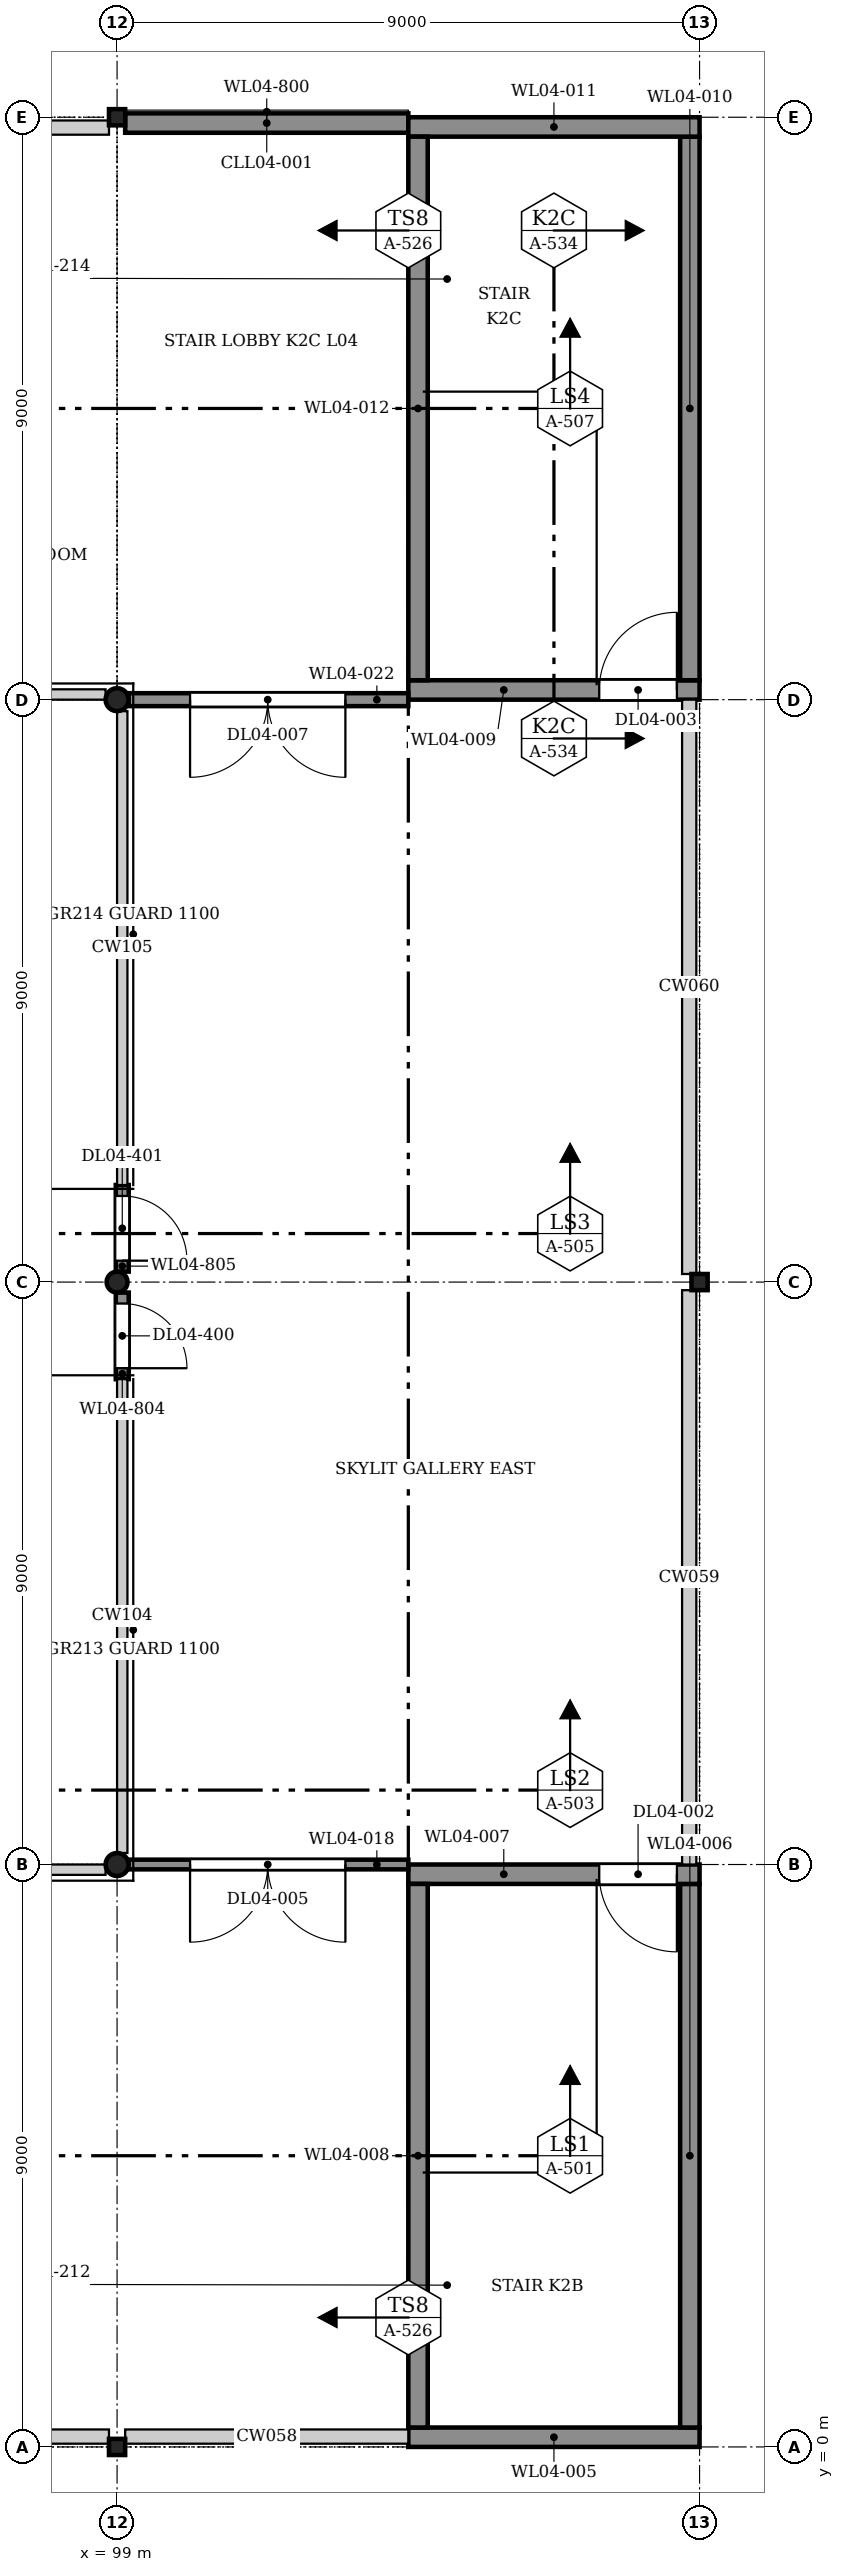
"""IFC4 building model, lengths in metres.
Left out: names, types, materials, properties, quantities, classifications, styles, units other than length and angle.
Written with IfcOpenShell. Run it as: python <this file> out.ifc"""

import sys

from ifc_helpers import new_model, si_unit, direction, frame, frame_2d, origin, origin_2d, place, context, subcontext, project, spatial, polyline, rectangle, hollow_rectangle, hollow_circle, outline, extrude, element, fill, save


model = new_model("IFC4")
c1 = context("Model", 3, precision=1e-05, world=origin(), true_north=direction((0.0, 1.0)))
c2 = subcontext(c1, "Body", "Model", "MODEL_VIEW")
j1 = project(units=[si_unit("LENGTHUNIT", "METRE"), si_unit("PLANEANGLEUNIT", "RADIAN")], contexts=[c1])
p1 = place(None, origin())
s1 = spatial("IfcSite", under=j1, at=p1, CompositionType="ELEMENT")
p2 = place(p1, origin())
s2 = spatial("IfcBuilding", under=s1, at=p2, CompositionType="ELEMENT")
p3 = place(p2, frame((0.0, 0.0, 21.2)))
s3 = spatial("IfcBuildingStorey", under=s2, at=p3, CompositionType="ELEMENT", Elevation=21.2)
p4 = place(p3, frame((99.0, 0.0, 0.0), z_axis=(0.0, 0.0, 1.0), x_axis=(1.0, 0.0, 0.0)))
e1 = element("IfcColumn", 1, at=p4, inside=s3, PredefinedType="COLUMN", context=c2, shape_type="SweptSolid", body=[
    extrude(hollow_rectangle(XDim=0.25, YDim=0.25, WallThickness=0.01, InnerFilletRadius=0.015, OuterFilletRadius=0.025, at=origin_2d()), origin(), (0.0, 0.0, 1.0), 3.6),
])
p5 = place(p3, frame((99.0, 9.0, 0.0), z_axis=(0.0, 0.0, 1.0), x_axis=(1.0, 0.0, 0.0)))
e2 = element("IfcColumn", 2, at=p5, inside=s3, PredefinedType="COLUMN", context=c2, shape_type="SweptSolid", body=[
    extrude(hollow_circle(Radius=0.178, WallThickness=0.013, at=origin_2d()), origin(), (0.0, 0.0, 1.0), 3.6),
])
p6 = place(p3, frame((99.0, 18.0, 0.0), z_axis=(0.0, 0.0, 1.0), x_axis=(1.0, 0.0, 0.0)))
e3 = element("IfcColumn", 3, at=p6, inside=s3, PredefinedType="COLUMN", context=c2, shape_type="SweptSolid", body=[
    extrude(hollow_circle(Radius=0.162, WallThickness=0.01, at=origin_2d()), origin(), (0.0, 0.0, 1.0), 3.6),
])
p7 = place(p3, frame((108.0, 18.0, 0.0), z_axis=(0.0, 0.0, 1.0), x_axis=(1.0, 0.0, 0.0)))
e4 = element("IfcColumn", 4, at=p7, inside=s3, PredefinedType="COLUMN", context=c2, shape_type="SweptSolid", body=[
    extrude(hollow_rectangle(XDim=0.25, YDim=0.25, WallThickness=0.01, InnerFilletRadius=0.015, OuterFilletRadius=0.025, at=origin_2d()), origin(), (0.0, 0.0, 1.0), 3.6),
])
p8 = place(p3, frame((99.0, 27.0, 0.0), z_axis=(0.0, 0.0, 1.0), x_axis=(1.0, 0.0, 0.0)))
e5 = element("IfcColumn", 5, at=p8, inside=s3, PredefinedType="COLUMN", context=c2, shape_type="SweptSolid", body=[
    extrude(hollow_circle(Radius=0.178, WallThickness=0.013, at=origin_2d()), origin(), (0.0, 0.0, 1.0), 3.6),
])
p9 = place(p3, frame((99.0, 36.0, 0.0), z_axis=(0.0, 0.0, 1.0), x_axis=(1.0, 0.0, 0.0)))
e6 = element("IfcColumn", 6, at=p9, inside=s3, PredefinedType="COLUMN", context=c2, shape_type="SweptSolid", body=[
    extrude(hollow_rectangle(XDim=0.25, YDim=0.25, WallThickness=0.01, InnerFilletRadius=0.015, OuterFilletRadius=0.025, at=origin_2d()), origin(), (0.0, 0.0, 1.0), 3.4),
])
p10 = place(p3, frame((99.125, 35.91, 0.0), z_axis=(0.0, 0.0, 1.0), x_axis=(1.0, 0.0, 0.0)))
e7 = element("IfcWall", 7, at=p10, inside=s3, PredefinedType="SOLIDWALL", context=c2, shape_type="SweptSolid", body=[
    extrude(rectangle(XDim=4.375, YDim=0.3, at=frame_2d((2.188, 0.0))), origin(), (0.0, 0.0, 1.0), 3.42),
])
p11 = place(p3, frame((99.125, 35.91, 3.878), z_axis=(0.0, 0.0, 1.0), x_axis=(1.0, 0.0, 0.0)))
e8 = element("IfcWall", 8, at=p11, inside=s3, PredefinedType="PARAPET", context=c2, shape_type="SweptSolid", body=[
    extrude(rectangle(XDim=4.375, YDim=0.2, at=frame_2d((2.188, 0.0))), origin(), (0.0, 0.0, 1.0), 0.522),
])
p12 = place(p3, frame((90.1, 35.96, 3.878), z_axis=(0.0, 0.0, 1.0), x_axis=(1.0, 0.0, 0.0)))
e9 = element("IfcWall", 9, at=p12, inside=s3, PredefinedType="PARAPET", context=c2, shape_type="SweptSolid", body=[
    extrude(rectangle(XDim=8.775, YDim=0.2, at=frame_2d((4.387, 0.0))), origin(), (0.0, 0.0, 1.0), 0.522),
])
p13 = place(p3, frame((99.08, 16.5, 0.0), z_axis=(0.0, 0.0, 1.0), x_axis=(0.0, 1.0, 0.0)))
e10 = element("IfcWall", 10, at=p13, inside=s3, PredefinedType="SOLIDWALL", context=c2, shape_type="SweptSolid", body=[
    extrude(rectangle(XDim=1.338, YDim=0.2, at=frame_2d((0.669, 0.0))), origin(), (0.0, 0.0, 1.0), 3.878),
])
p14 = place(p13, frame((0.169, 0.0, 0.0)))
e11 = element("IfcOpeningElement", 11, at=p14, cuts=e10, PredefinedType="OPENING", context=c2, shape_type="SweptSolid", body=[
    extrude(rectangle(XDim=1.0, YDim=2.4, at=frame_2d((0.5, 1.2))), frame((0.0, 0.11, 0.0), z_axis=(0.0, -1.0, 0.0), x_axis=(1.0, 0.0, 0.0)), (0.0, 0.0, 1.0), 0.22),
])
p15 = place(p3, frame((99.08, 18.162, 0.0), z_axis=(0.0, 0.0, 1.0), x_axis=(0.0, 1.0, 0.0)))
e12 = element("IfcWall", 12, at=p15, inside=s3, PredefinedType="SOLIDWALL", context=c2, shape_type="SweptSolid", body=[
    extrude(rectangle(XDim=1.338, YDim=0.2, at=frame_2d((0.669, 0.0))), origin(), (0.0, 0.0, 1.0), 3.878),
])
p16 = place(p15, frame((0.169, 0.0, 0.0)))
e13 = element("IfcOpeningElement", 13, at=p16, cuts=e12, PredefinedType="OPENING", context=c2, shape_type="SweptSolid", body=[
    extrude(rectangle(XDim=1.0, YDim=2.4, at=frame_2d((0.5, 1.2))), frame((0.0, 0.11, 0.0), z_axis=(0.0, -1.0, 0.0), x_axis=(1.0, 0.0, 0.0)), (0.0, 0.0, 1.0), 0.22),
])
p17 = place(p3, frame((107.9, 9.175, 3.878), z_axis=(0.0, 0.0, 1.0), x_axis=(0.0, 1.0, 0.0)))
e14 = element("IfcWall", 14, at=p17, inside=s3, PredefinedType="SOLIDWALL", context=c2, shape_type="SweptSolid", body=[
    extrude(outline(polyline([(0.0, 0.0), (8.825, 0.0), (8.825, 0.05), (0.0, 1.6), (0.0, 0.0)])), frame((0.0, 0.05, 0.0), z_axis=(0.0, -1.0, 0.0), x_axis=(1.0, 0.0, 0.0)), (0.0, 0.0, 1.0), 0.1),
])
p18 = place(p3, frame((107.9, 18.189, 3.878), z_axis=(0.0, 0.0, 1.0), x_axis=(0.0, 1.0, 0.0)))
e15 = element("IfcWall", 15, at=p18, inside=s3, PredefinedType="SOLIDWALL", context=c2, shape_type="SweptSolid", body=[
    extrude(outline(polyline([(0.0, 0.0), (8.811, 0.0), (8.811, 0.05), (0.0, 1.6), (0.0, 0.0)])), frame((0.0, 0.05, 0.0), z_axis=(0.0, -1.0, 0.0), x_axis=(1.0, 0.0, 0.0)), (0.0, 0.0, 1.0), 0.1),
])
p19 = place(p3, frame((103.5, 0.15, 0.0), z_axis=(0.0, 0.0, 1.0), x_axis=(1.0, 0.0, 0.0)))
e16 = element("IfcWall", 16, at=p19, inside=s3, PredefinedType="SOLIDWALL", context=c2, shape_type="SweptSolid", body=[
    extrude(rectangle(XDim=4.5, YDim=0.3, at=frame_2d((2.25, 0.0))), origin(), (0.0, 0.0, 1.0), 3.628),
])
p20 = place(p3, frame((107.85, 0.3, 0.0), z_axis=(0.0, 0.0, 1.0), x_axis=(0.0, 1.0, 0.0)))
e17 = element("IfcWall", 17, at=p20, inside=s3, PredefinedType="SOLIDWALL", context=c2, shape_type="SweptSolid", body=[
    extrude(rectangle(XDim=8.4, YDim=0.3, at=frame_2d((4.2, 0.0))), origin(), (0.0, 0.0, 1.0), 3.628),
])
p21 = place(p3, frame((103.5, 8.85, 0.0), z_axis=(0.0, 0.0, 1.0), x_axis=(1.0, 0.0, 0.0)))
e18 = element("IfcWall", 18, at=p21, inside=s3, PredefinedType="SOLIDWALL", context=c2, shape_type="SweptSolid", body=[
    extrude(rectangle(XDim=4.5, YDim=0.3, at=frame_2d((2.25, 0.0))), origin(), (0.0, 0.0, 1.0), 3.628),
])
p22 = place(p21, frame((2.95, 0.0, 0.0)))
e19 = element("IfcOpeningElement", 19, at=p22, cuts=e18, PredefinedType="OPENING", context=c2, shape_type="SweptSolid", body=[
    extrude(rectangle(XDim=1.2, YDim=2.1, at=frame_2d((0.6, 1.05))), frame((0.0, 0.16, 0.0), z_axis=(0.0, -1.0, 0.0), x_axis=(1.0, 0.0, 0.0)), (0.0, 0.0, 1.0), 0.32),
])
p23 = place(p3, frame((103.65, 0.3, 0.0), z_axis=(0.0, 0.0, 1.0), x_axis=(0.0, 1.0, 0.0)))
e20 = element("IfcWall", 20, at=p23, inside=s3, PredefinedType="SOLIDWALL", context=c2, shape_type="SweptSolid", body=[
    extrude(rectangle(XDim=8.4, YDim=0.3, at=frame_2d((4.2, 0.0))), origin(), (0.0, 0.0, 1.0), 3.628),
])
p24 = place(p3, frame((103.5, 27.15, 0.0), z_axis=(0.0, 0.0, 1.0), x_axis=(1.0, 0.0, 0.0)))
e21 = element("IfcWall", 21, at=p24, inside=s3, PredefinedType="SOLIDWALL", context=c2, shape_type="SweptSolid", body=[
    extrude(rectangle(XDim=4.5, YDim=0.3, at=frame_2d((2.25, 0.0))), origin(), (0.0, 0.0, 1.0), 3.628),
])
p25 = place(p24, frame((2.95, 0.0, 0.0)))
e22 = element("IfcOpeningElement", 22, at=p25, cuts=e21, PredefinedType="OPENING", context=c2, shape_type="SweptSolid", body=[
    extrude(rectangle(XDim=1.2, YDim=2.1, at=frame_2d((0.6, 1.05))), frame((0.0, 0.16, 0.0), z_axis=(0.0, -1.0, 0.0), x_axis=(1.0, 0.0, 0.0)), (0.0, 0.0, 1.0), 0.32),
])
p26 = place(p3, frame((107.85, 27.3, 0.0), z_axis=(0.0, 0.0, 1.0), x_axis=(0.0, 1.0, 0.0)))
e23 = element("IfcWall", 23, at=p26, inside=s3, PredefinedType="SOLIDWALL", context=c2, shape_type="SweptSolid", body=[
    extrude(rectangle(XDim=8.4, YDim=0.3, at=frame_2d((4.2, 0.0))), origin(), (0.0, 0.0, 1.0), 3.628),
])
p27 = place(p3, frame((103.5, 35.85, 0.0), z_axis=(0.0, 0.0, 1.0), x_axis=(1.0, 0.0, 0.0)))
e24 = element("IfcWall", 24, at=p27, inside=s3, PredefinedType="SOLIDWALL", context=c2, shape_type="SweptSolid", body=[
    extrude(rectangle(XDim=4.5, YDim=0.3, at=frame_2d((2.25, 0.0))), origin(), (0.0, 0.0, 1.0), 3.628),
])
p28 = place(p3, frame((103.65, 27.3, 0.0), z_axis=(0.0, 0.0, 1.0), x_axis=(0.0, 1.0, 0.0)))
e25 = element("IfcWall", 25, at=p28, inside=s3, PredefinedType="SOLIDWALL", context=c2, shape_type="SweptSolid", body=[
    extrude(rectangle(XDim=8.4, YDim=0.3, at=frame_2d((4.2, 0.0))), origin(), (0.0, 0.0, 1.0), 3.628),
])
p29 = place(p3, frame((99.178, 9.0, 0.0), z_axis=(0.0, 0.0, 1.0), x_axis=(1.0, 0.0, 0.0)))
e26 = element("IfcWall", 26, at=p29, inside=s3, PredefinedType="PARTITIONING", context=c2, shape_type="SweptSolid", body=[
    extrude(rectangle(XDim=4.322, YDim=0.15, at=frame_2d((2.161, 0.0))), origin(), (0.0, 0.0, 1.0), 3.54),
])
p30 = place(p29, frame((0.95, 0.0, 0.0)))
e27 = element("IfcOpeningElement", 27, at=p30, cuts=e26, PredefinedType="OPENING", context=c2, shape_type="SweptSolid", body=[
    extrude(rectangle(XDim=2.4, YDim=2.4, at=frame_2d((1.2, 1.2))), frame((0.0, 0.085, 0.0), z_axis=(0.0, -1.0, 0.0), x_axis=(1.0, 0.0, 0.0)), (0.0, 0.0, 1.0), 0.17),
])
p31 = place(p3, frame((99.178, 27.0, 0.0), z_axis=(0.0, 0.0, 1.0), x_axis=(1.0, 0.0, 0.0)))
e28 = element("IfcWall", 28, at=p31, inside=s3, PredefinedType="PARTITIONING", context=c2, shape_type="SweptSolid", body=[
    extrude(rectangle(XDim=4.322, YDim=0.2, at=frame_2d((2.161, 0.0))), origin(), (0.0, 0.0, 1.0), 3.54),
])
p32 = place(p31, frame((0.95, 0.0, 0.0)))
e29 = element("IfcOpeningElement", 29, at=p32, cuts=e28, PredefinedType="OPENING", context=c2, shape_type="SweptSolid", body=[
    extrude(rectangle(XDim=2.4, YDim=2.4, at=frame_2d((1.2, 1.2))), frame((0.0, 0.11, 0.0), z_axis=(0.0, -1.0, 0.0), x_axis=(1.0, 0.0, 0.0)), (0.0, 0.0, 1.0), 0.22),
])
p33 = place(p14, frame((1.0, 0.0, 0.0), z_axis=(0.0, 0.0, 1.0), x_axis=(-1.0, 0.0, 0.0)))
e30 = element("IfcDoor", 30, at=p33, inside=s3, OperationType="SINGLE_SWING_LEFT", PredefinedType="DOOR", context=c2, shape_type="SweptSolid", body=[
    extrude(rectangle(XDim=1.0, YDim=2.4, at=frame_2d((0.5, 1.2))), frame((0.0, 0.025, 0.0), z_axis=(0.0, -1.0, 0.0), x_axis=(1.0, 0.0, 0.0)), (0.0, 0.0, 1.0), 0.05),
])
fill(e11, e30)
p34 = place(p16, frame((1.0, 0.0, 0.0), z_axis=(0.0, 0.0, 1.0), x_axis=(-1.0, 0.0, 0.0)))
e31 = element("IfcDoor", 31, at=p34, inside=s3, OperationType="SINGLE_SWING_LEFT", PredefinedType="DOOR", context=c2, shape_type="SweptSolid", body=[
    extrude(rectangle(XDim=1.0, YDim=2.4, at=frame_2d((0.5, 1.2))), frame((0.0, 0.025, 0.0), z_axis=(0.0, -1.0, 0.0), x_axis=(1.0, 0.0, 0.0)), (0.0, 0.0, 1.0), 0.05),
])
fill(e13, e31)
p35 = place(p2, frame((0.0, 0.0, 25.2)))
p36 = place(p35, frame((76.85, 0.125, -0.146), z_axis=(0.0, 0.0, 1.0), x_axis=(1.0, 0.0, 0.0)))
p37 = place(p36, frame((18.1, 0.0, 0.15)))
p38 = place(p37, origin())
e32 = element("IfcWindow", 32, at=p38, inside=s3, PartitioningType="SINGLE_PANEL", PredefinedType="SKYLIGHT", context=c2, shape_type="SweptSolid", body=[
    extrude(rectangle(XDim=3.6, YDim=1.0, at=frame_2d((1.8, 0.5))), frame((0.0, 0.03, 0.0), z_axis=(0.0, -1.0, 0.0), x_axis=(1.0, 0.0, 0.0)), (0.0, 0.0, 1.0), 0.06),
])
p39 = place(p35, frame((81.0, 9.125, -0.146), z_axis=(0.0, 0.0, 1.0), x_axis=(1.0, 0.0, 0.0)))
p40 = place(p39, frame((13.95, 0.0, 0.15)))
p41 = place(p40, origin())
e33 = element("IfcWindow", 33, at=p41, inside=s3, PartitioningType="SINGLE_PANEL", PredefinedType="SKYLIGHT", context=c2, shape_type="SweptSolid", body=[
    extrude(rectangle(XDim=3.6, YDim=1.0, at=frame_2d((1.8, 0.5))), frame((0.0, 0.03, 0.0), z_axis=(0.0, -1.0, 0.0), x_axis=(1.0, 0.0, 0.0)), (0.0, 0.0, 1.0), 0.06),
])
p42 = place(p35, frame((99.0, 9.125, -0.146), z_axis=(0.0, 0.0, 1.0), x_axis=(1.0, 0.0, 0.0)))
p43 = place(p42, frame((0.45, 0.0, 0.15)))
p44 = place(p43, origin())
e34 = element("IfcWindow", 34, at=p44, inside=s3, PartitioningType="SINGLE_PANEL", PredefinedType="SKYLIGHT", context=c2, shape_type="SweptSolid", body=[
    extrude(rectangle(XDim=3.6, YDim=1.0, at=frame_2d((1.8, 0.5))), frame((0.0, 0.03, 0.0), z_axis=(0.0, -1.0, 0.0), x_axis=(1.0, 0.0, 0.0)), (0.0, 0.0, 1.0), 0.06),
])
p45 = place(p42, frame((4.95, 0.0, 0.15)))
p46 = place(p45, origin())
e35 = element("IfcWindow", 35, at=p46, inside=s3, PartitioningType="SINGLE_PANEL", PredefinedType="SKYLIGHT", context=c2, shape_type="SweptSolid", body=[
    extrude(rectangle(XDim=3.6, YDim=1.0, at=frame_2d((1.8, 0.5))), frame((0.0, 0.03, 0.0), z_axis=(0.0, -1.0, 0.0), x_axis=(1.0, 0.0, 0.0)), (0.0, 0.0, 1.0), 0.06),
])
p47 = place(p35, frame((81.0, 18.139, -0.14), z_axis=(0.0, 0.0, 1.0), x_axis=(1.0, 0.0, 0.0)))
p48 = place(p47, frame((13.95, 0.0, 0.15)))
p49 = place(p48, origin())
e36 = element("IfcWindow", 36, at=p49, inside=s3, PartitioningType="SINGLE_PANEL", PredefinedType="SKYLIGHT", context=c2, shape_type="SweptSolid", body=[
    extrude(rectangle(XDim=3.6, YDim=1.0, at=frame_2d((1.8, 0.5))), frame((0.0, 0.03, 0.0), z_axis=(0.0, -1.0, 0.0), x_axis=(1.0, 0.0, 0.0)), (0.0, 0.0, 1.0), 0.06),
])
p50 = place(p35, frame((99.0, 18.139, -0.14), z_axis=(0.0, 0.0, 1.0), x_axis=(1.0, 0.0, 0.0)))
p51 = place(p50, frame((0.45, 0.0, 0.15)))
p52 = place(p51, origin())
e37 = element("IfcWindow", 37, at=p52, inside=s3, PartitioningType="SINGLE_PANEL", PredefinedType="SKYLIGHT", context=c2, shape_type="SweptSolid", body=[
    extrude(rectangle(XDim=3.6, YDim=1.0, at=frame_2d((1.8, 0.5))), frame((0.0, 0.03, 0.0), z_axis=(0.0, -1.0, 0.0), x_axis=(1.0, 0.0, 0.0)), (0.0, 0.0, 1.0), 0.06),
])
p53 = place(p50, frame((4.95, 0.0, 0.15)))
p54 = place(p53, origin())
e38 = element("IfcWindow", 38, at=p54, inside=s3, PartitioningType="SINGLE_PANEL", PredefinedType="SKYLIGHT", context=c2, shape_type="SweptSolid", body=[
    extrude(rectangle(XDim=3.6, YDim=1.0, at=frame_2d((1.8, 0.5))), frame((0.0, 0.03, 0.0), z_axis=(0.0, -1.0, 0.0), x_axis=(1.0, 0.0, 0.0)), (0.0, 0.0, 1.0), 0.06),
])
p55 = place(p35, frame((76.85, 27.125, -0.146), z_axis=(0.0, 0.0, 1.0), x_axis=(1.0, 0.0, 0.0)))
p56 = place(p55, frame((18.1, 0.0, 0.15)))
p57 = place(p56, origin())
e39 = element("IfcWindow", 39, at=p57, inside=s3, PartitioningType="SINGLE_PANEL", PredefinedType="SKYLIGHT", context=c2, shape_type="SweptSolid", body=[
    extrude(rectangle(XDim=3.6, YDim=1.0, at=frame_2d((1.8, 0.5))), frame((0.0, 0.03, 0.0), z_axis=(0.0, -1.0, 0.0), x_axis=(1.0, 0.0, 0.0)), (0.0, 0.0, 1.0), 0.06),
])
p58 = place(p35, frame((0.0, 0.0, -0.122)))
p59 = place(p58, frame((105.0, 4.5, -0.01)))
p60 = place(p59, frame((0.0, 0.0, 0.36)))
e40 = element("IfcDoor", 40, at=p60, inside=s3, OperationType="SINGLE_SWING_LEFT", PredefinedType="TRAPDOOR", context=c2, shape_type="SweptSolid", body=[
    extrude(rectangle(XDim=0.9, YDim=1.2, at=origin_2d()), origin(), (0.0, 0.0, 1.0), 0.05),
])
p61 = place(p35, frame((0.0, 0.0, -0.122)))
p62 = place(p61, frame((105.0, 31.5, -0.01)))
p63 = place(p62, frame((0.0, 0.0, 0.36)))
e41 = element("IfcDoor", 41, at=p63, inside=s3, OperationType="SINGLE_SWING_LEFT", PredefinedType="TRAPDOOR", context=c2, shape_type="SweptSolid", body=[
    extrude(rectangle(XDim=0.9, YDim=1.2, at=origin_2d()), origin(), (0.0, 0.0, 1.0), 0.05),
])
p64 = place(p22, frame((1.2, 0.0, 0.0), z_axis=(0.0, 0.0, 1.0), x_axis=(-1.0, 0.0, 0.0)))
e42 = element("IfcDoor", 42, at=p64, inside=s3, OperationType="SINGLE_SWING_RIGHT", PredefinedType="DOOR", context=c2, shape_type="SweptSolid", body=[
    extrude(rectangle(XDim=1.2, YDim=2.1, at=frame_2d((0.6, 1.05))), frame((0.0, 0.025, 0.0), z_axis=(0.0, -1.0, 0.0), x_axis=(1.0, 0.0, 0.0)), (0.0, 0.0, 1.0), 0.05),
])
fill(e19, e42)
p65 = place(p25, origin())
e43 = element("IfcDoor", 43, at=p65, inside=s3, OperationType="SINGLE_SWING_LEFT", PredefinedType="DOOR", context=c2, shape_type="SweptSolid", body=[
    extrude(rectangle(XDim=1.2, YDim=2.1, at=frame_2d((0.6, 1.05))), frame((0.0, 0.025, 0.0), z_axis=(0.0, -1.0, 0.0), x_axis=(1.0, 0.0, 0.0)), (0.0, 0.0, 1.0), 0.05),
])
fill(e22, e43)
p66 = place(p30, frame((2.4, 0.0, 0.0), z_axis=(0.0, 0.0, 1.0), x_axis=(-1.0, 0.0, 0.0)))
e44 = element("IfcDoor", 44, at=p66, inside=s3, OperationType="DOUBLE_DOOR_SINGLE_SWING", PredefinedType="DOOR", context=c2, shape_type="SweptSolid", body=[
    extrude(rectangle(XDim=2.4, YDim=2.4, at=frame_2d((1.2, 1.2))), frame((0.0, 0.025, 0.0), z_axis=(0.0, -1.0, 0.0), x_axis=(1.0, 0.0, 0.0)), (0.0, 0.0, 1.0), 0.05),
])
fill(e27, e44)
p67 = place(p32, frame((2.4, 0.0, 0.0), z_axis=(0.0, 0.0, 1.0), x_axis=(-1.0, 0.0, 0.0)))
e45 = element("IfcDoor", 45, at=p67, inside=s3, OperationType="DOUBLE_DOOR_SINGLE_SWING", PredefinedType="DOOR", context=c2, shape_type="SweptSolid", body=[
    extrude(rectangle(XDim=2.4, YDim=2.4, at=frame_2d((1.2, 1.2))), frame((0.0, 0.025, 0.0), z_axis=(0.0, -1.0, 0.0), x_axis=(1.0, 0.0, 0.0)), (0.0, 0.0, 1.0), 0.05),
])
fill(e29, e45)
save(model, sys.argv[1])
